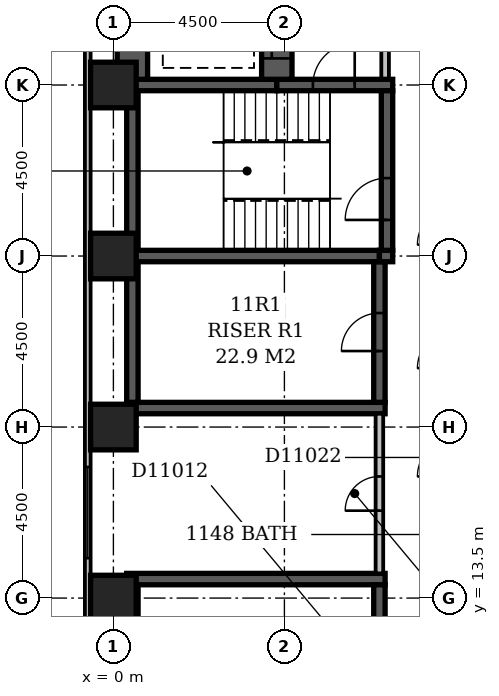
"""IFC4 building model, lengths in metres.
Left out: names, types, materials, properties, quantities, classifications, styles, units other than length and angle.
Written with IfcOpenShell. Run it as: python <this file> out.ifc"""

import sys

from ifc_helpers import new_model, si_unit, direction, frame, frame_2d, origin, origin_2d, place, context, subcontext, project, spatial, rectangle, extrude, element, fill, save


model = new_model("IFC4")
c1 = context("Model", 3, precision=1e-05, world=origin(), true_north=direction((0.0, 1.0)))
c2 = subcontext(c1, "Body", "Model", "MODEL_VIEW")
j1 = project(units=[si_unit("LENGTHUNIT", "METRE"), si_unit("PLANEANGLEUNIT", "RADIAN")], contexts=[c1])
p1 = place(None, origin())
s1 = spatial("IfcSite", under=j1, at=p1, CompositionType="ELEMENT")
p2 = place(p1, origin())
s2 = spatial("IfcBuilding", under=s1, at=p2, CompositionType="ELEMENT")
p3 = place(p2, frame((0.0, 0.0, 50.6)))
s3 = spatial("IfcBuildingStorey", under=s2, at=p3, CompositionType="ELEMENT", Elevation=50.6)
for number, where, z_axis, x_axis in (
    (1, (0.35, 14.0, -0.3), (0.0, 0.0, 1.0), (1.0, 0.0, 0.0)),
    (2, (0.35, 18.5, -0.3), (0.0, 0.0, 1.0), (1.0, 0.0, 0.0)),
):
    element("IfcWall", number, at=place(p3, frame(where, z_axis=z_axis, x_axis=x_axis)), inside=s3, PredefinedType="SHEAR", context=c2, shape_type="SweptSolid", body=[
        extrude(rectangle(XDim=6.8, YDim=0.3, at=frame_2d((3.4, 0.0))), origin(), (0.0, 0.0, 1.0), 3.6),
    ])
p4 = place(p3, frame((0.35, 22.5, -0.3), z_axis=(0.0, 0.0, 1.0), x_axis=(1.0, 0.0, 0.0)))
e3 = element("IfcWall", 3, at=p4, inside=s3, PredefinedType="SHEAR", context=c2, shape_type="SweptSolid", body=[
    extrude(rectangle(XDim=6.65, YDim=0.3, at=frame_2d((3.325, 0.0))), origin(), (0.0, 0.0, 1.0), 3.6),
])
p5 = place(p3, frame((0.35, 27.0, -0.3), z_axis=(0.0, 0.0, 1.0), x_axis=(1.0, 0.0, 0.0)))
e4 = element("IfcWall", 4, at=p5, inside=s3, PredefinedType="SHEAR", context=c2, shape_type="SweptSolid", body=[
    extrude(rectangle(XDim=3.95, YDim=0.3, at=frame_2d((1.975, 0.0))), origin(), (0.0, 0.0, 1.0), 3.6),
])
for number, where, z_axis, x_axis in (
    (5, (0.5, 10.15, -0.3), (0.0, 0.0, 1.0), (0.0, 1.0, 0.0)),
    (6, (0.5, 18.65, -0.3), (0.0, 0.0, 1.0), (0.0, 1.0, 0.0)),
):
    element("IfcWall", number, at=place(p3, frame(where, z_axis=z_axis, x_axis=x_axis)), inside=s3, PredefinedType="SHEAR", context=c2, shape_type="SweptSolid", body=[
        extrude(rectangle(XDim=3.7, YDim=0.3, at=frame_2d((1.85, 0.0))), origin(), (0.0, 0.0, 1.0), 3.6),
    ])
p6 = place(p3, frame((0.5, 22.65, -0.3), z_axis=(0.0, 0.0, 1.0), x_axis=(0.0, 1.0, 0.0)))
e7 = element("IfcWall", 7, at=p6, inside=s3, PredefinedType="SHEAR", context=c2, shape_type="SweptSolid", body=[
    extrude(rectangle(XDim=4.2, YDim=0.3, at=frame_2d((2.1, 0.0))), origin(), (0.0, 0.0, 1.0), 3.6),
])
p7 = place(p3, frame((0.5, 27.15, -0.3), z_axis=(0.0, 0.0, 1.0), x_axis=(0.0, 1.0, 0.0)))
e8 = element("IfcWall", 8, at=p7, inside=s3, PredefinedType="SHEAR", context=c2, shape_type="SweptSolid", body=[
    extrude(rectangle(XDim=6.95, YDim=0.8, at=frame_2d((3.475, 0.0))), origin(), (0.0, 0.0, 1.0), 3.6),
])
p8 = place(p3, frame((4.3, 27.0, -0.3), z_axis=(0.0, 0.0, 1.0), x_axis=(1.0, 0.0, 0.0)))
e9 = element("IfcWall", 9, at=p8, inside=s3, PredefinedType="SHEAR", context=c2, shape_type="SweptSolid", body=[
    extrude(rectangle(XDim=3.05, YDim=0.3, at=frame_2d((1.525, 0.0))), origin(), (0.0, 0.0, 1.0), 3.6),
])
p9 = place(p8, frame((0.95, 0.0, 0.3)))
e10 = element("IfcOpeningElement", 10, at=p9, cuts=e9, PredefinedType="OPENING", context=c2, shape_type="SweptSolid", body=[
    extrude(rectangle(XDim=1.1, YDim=2.1, at=frame_2d((0.55, 1.05))), frame((0.0, 0.162, 0.0), z_axis=(0.0, -1.0, 0.0), x_axis=(1.0, 0.0, 0.0)), (0.0, 0.0, 1.0), 0.324),
])
p10 = place(p3, frame((4.3, 27.15, -0.3), z_axis=(0.0, 0.0, 1.0), x_axis=(0.0, 1.0, 0.0)))
e11 = element("IfcWall", 11, at=p10, inside=s3, PredefinedType="SHEAR", context=c2, shape_type="SweptSolid", body=[
    extrude(rectangle(XDim=6.95, YDim=0.8, at=frame_2d((3.475, 0.0))), origin(), (0.0, 0.0, 1.0), 3.6),
])
p11 = place(p10, frame((3.05, 0.0, 0.3)))
e12 = element("IfcOpeningElement", 12, at=p11, cuts=e11, PredefinedType="OPENING", context=c2, shape_type="SweptSolid", body=[
    extrude(rectangle(XDim=1.1, YDim=2.1, at=frame_2d((0.55, 1.05))), frame((0.0, 0.412, 0.0), z_axis=(0.0, -1.0, 0.0), x_axis=(1.0, 0.0, 0.0)), (0.0, 0.0, 1.0), 0.824),
])
p12 = place(p10, frame((0.55, 0.0, 0.3)))
e13 = element("IfcOpeningElement", 13, at=p12, cuts=e11, PredefinedType="OPENING", context=c2, shape_type="SweptSolid", body=[
    extrude(rectangle(XDim=1.1, YDim=2.1, at=frame_2d((0.55, 1.05))), frame((0.0, 0.412, 0.0), z_axis=(0.0, -1.0, 0.0), x_axis=(1.0, 0.0, 0.0)), (0.0, 0.0, 1.0), 0.824),
])
p13 = place(p10, frame((5.35, 0.0, 0.3)))
e14 = element("IfcOpeningElement", 14, at=p13, cuts=e11, PredefinedType="OPENING", context=c2, shape_type="SweptSolid", body=[
    extrude(rectangle(XDim=1.1, YDim=2.1, at=frame_2d((0.55, 1.05))), frame((0.0, 0.412, 0.0), z_axis=(0.0, -1.0, 0.0), x_axis=(1.0, 0.0, 0.0)), (0.0, 0.0, 1.0), 0.824),
])
p14 = place(p3, frame((7.0, 10.15, -0.3), z_axis=(0.0, 0.0, 1.0), x_axis=(0.0, 1.0, 0.0)))
e15 = element("IfcWall", 15, at=p14, inside=s3, PredefinedType="SHEAR", context=c2, shape_type="SweptSolid", body=[
    extrude(rectangle(XDim=3.7, YDim=0.3, at=frame_2d((1.85, 0.0))), origin(), (0.0, 0.0, 1.0), 3.6),
])
p15 = place(p14, frame((1.35, 0.0, 0.3)))
e16 = element("IfcOpeningElement", 16, at=p15, cuts=e15, PredefinedType="OPENING", context=c2, shape_type="SweptSolid", body=[
    extrude(rectangle(XDim=1.0, YDim=2.1, at=frame_2d((0.5, 1.05))), frame((0.0, 0.162, 0.0), z_axis=(0.0, -1.0, 0.0), x_axis=(1.0, 0.0, 0.0)), (0.0, 0.0, 1.0), 0.324),
])
p16 = place(p3, frame((7.0, 18.65, -0.3), z_axis=(0.0, 0.0, 1.0), x_axis=(0.0, 1.0, 0.0)))
e17 = element("IfcWall", 17, at=p16, inside=s3, PredefinedType="SHEAR", context=c2, shape_type="SweptSolid", body=[
    extrude(rectangle(XDim=3.7, YDim=0.3, at=frame_2d((1.85, 0.0))), origin(), (0.0, 0.0, 1.0), 3.6),
])
p17 = place(p16, frame((1.35, 0.0, 0.3)))
e18 = element("IfcOpeningElement", 18, at=p17, cuts=e17, PredefinedType="OPENING", context=c2, shape_type="SweptSolid", body=[
    extrude(rectangle(XDim=1.0, YDim=2.1, at=frame_2d((0.5, 1.05))), frame((0.0, 0.162, 0.0), z_axis=(0.0, -1.0, 0.0), x_axis=(1.0, 0.0, 0.0)), (0.0, 0.0, 1.0), 0.324),
])
p18 = place(p3, frame((7.0, 22.5, -0.3), z_axis=(0.0, 0.0, 1.0), x_axis=(1.0, 0.0, 0.0)))
e19 = element("IfcWall", 19, at=p18, inside=s3, PredefinedType="SHEAR", context=c2, shape_type="SweptSolid", body=[
    extrude(rectangle(XDim=0.35, YDim=0.3, at=frame_2d((0.175, 0.0))), origin(), (0.0, 0.0, 1.0), 3.6),
])
p19 = place(p3, frame((7.2, 22.65, -0.3), z_axis=(0.0, 0.0, 1.0), x_axis=(0.0, 1.0, 0.0)))
e20 = element("IfcWall", 20, at=p19, inside=s3, PredefinedType="SHEAR", context=c2, shape_type="SweptSolid", body=[
    extrude(rectangle(XDim=4.2, YDim=0.3, at=frame_2d((2.1, 0.0))), origin(), (0.0, 0.0, 1.0), 3.6),
])
p20 = place(p19, frame((0.8, 0.0, 0.3)))
e21 = element("IfcOpeningElement", 21, at=p20, cuts=e20, PredefinedType="OPENING", context=c2, shape_type="SweptSolid", body=[
    extrude(rectangle(XDim=1.1, YDim=2.1, at=frame_2d((0.55, 1.05))), frame((0.0, 0.162, 0.0), z_axis=(0.0, -1.0, 0.0), x_axis=(1.0, 0.0, 0.0)), (0.0, 0.0, 1.0), 0.324),
])
for number, where, z_axis, x_axis in (
    (22, (0.0, 13.5, -0.3), (0.0, 0.0, 1.0), (1.0, 0.0, 0.0)),
    (23, (0.0, 18.0, -0.3), (0.0, 0.0, 1.0), (1.0, 0.0, 0.0)),
    (24, (0.0, 22.5, -0.3), (0.0, 0.0, 1.0), (1.0, 0.0, 0.0)),
    (25, (0.0, 27.0, -0.3), (0.0, 0.0, 1.0), (1.0, 0.0, 0.0)),
):
    element("IfcColumn", number, at=place(p3, frame(where, z_axis=z_axis, x_axis=x_axis)), inside=s3, PredefinedType="COLUMN", context=c2, shape_type="SweptSolid", body=[
        extrude(rectangle(XDim=1.2, YDim=1.2, at=origin_2d()), origin(), (0.0, 0.0, 1.0), 3.6),
    ])
p21 = place(p3, frame((-0.675, 59.1, 0.0), z_axis=(0.0, 0.0, 1.0), x_axis=(0.0, -1.0, 0.0)))
e26 = element("IfcWall", 26, at=p21, inside=s3, PredefinedType="STANDARD", context=c2, shape_type="SweptSolid", body=[
    extrude(rectangle(XDim=55.35, YDim=0.15, at=frame_2d((27.675, 0.0))), origin(), (0.0, 0.0, 1.0), 2.7),
])
p22 = place(p21, frame((10.65, 0.0, 0.6)))
e27 = element("IfcOpeningElement", 27, at=p22, cuts=e26, PredefinedType="OPENING", context=c2, shape_type="SweptSolid", body=[
    extrude(rectangle(XDim=2.4, YDim=1.8, at=frame_2d((1.2, 0.9))), frame((0.0, 0.087, 0.0), z_axis=(0.0, -1.0, 0.0), x_axis=(1.0, 0.0, 0.0)), (0.0, 0.0, 1.0), 0.174),
])
p23 = place(p21, frame((42.15, 0.0, 0.6)))
e28 = element("IfcOpeningElement", 28, at=p23, cuts=e26, PredefinedType="OPENING", context=c2, shape_type="SweptSolid", body=[
    extrude(rectangle(XDim=2.4, YDim=1.8, at=frame_2d((1.2, 0.9))), frame((0.0, 0.087, 0.0), z_axis=(0.0, -1.0, 0.0), x_axis=(1.0, 0.0, 0.0)), (0.0, 0.0, 1.0), 0.174),
])
p24 = place(p3, frame((7.15, 27.17, 0.0), z_axis=(0.0, 0.0, 1.0), x_axis=(0.0, 1.0, 0.0)))
e29 = element("IfcWall", 29, at=p24, inside=s3, PredefinedType="PARTITIONING", context=c2, shape_type="SweptSolid", body=[
    extrude(rectangle(XDim=4.83, YDim=0.2, at=frame_2d((2.415, 0.0))), origin(), (0.0, 0.0, 1.0), 3.3),
])
p25 = place(p24, frame((1.73, 0.0, 0.0)))
e30 = element("IfcOpeningElement", 30, at=p25, cuts=e29, PredefinedType="OPENING", context=c2, shape_type="SweptSolid", body=[
    extrude(rectangle(XDim=1.2, YDim=2.1, at=frame_2d((0.6, 1.05))), frame((0.0, 0.112, 0.0), z_axis=(0.0, -1.0, 0.0), x_axis=(1.0, 0.0, 0.0)), (0.0, 0.0, 1.0), 0.224),
])
p26 = place(p3, frame((7.0, 14.15, 0.0), z_axis=(0.0, 0.0, 1.0), x_axis=(0.0, 1.0, 0.0)))
e31 = element("IfcWall", 31, at=p26, inside=s3, PredefinedType="PARTITIONING", context=c2, shape_type="SweptSolid", body=[
    extrude(rectangle(XDim=4.2, YDim=0.2, at=frame_2d((2.1, 0.0))), origin(), (0.0, 0.0, 1.0), 3.3),
])
p27 = place(p26, frame((1.65, 0.0, 0.0)))
e32 = element("IfcOpeningElement", 32, at=p27, cuts=e31, PredefinedType="OPENING", context=c2, shape_type="SweptSolid", body=[
    extrude(rectangle(XDim=0.9, YDim=2.1, at=frame_2d((0.45, 1.05))), frame((0.0, 0.112, 0.0), z_axis=(0.0, -1.0, 0.0), x_axis=(1.0, 0.0, 0.0)), (0.0, 0.0, 1.0), 0.224),
])
p28 = place(p23, origin())
e33 = element("IfcWindow", 33, at=p28, inside=s3, PartitioningType="SINGLE_PANEL", PredefinedType="WINDOW", context=c2, shape_type="SweptSolid", body=[
    extrude(rectangle(XDim=2.4, YDim=1.8, at=frame_2d((1.2, 0.9))), frame((0.0, 0.03, 0.0), z_axis=(0.0, -1.0, 0.0), x_axis=(1.0, 0.0, 0.0)), (0.0, 0.0, 1.0), 0.06),
])
fill(e28, e33)
p29 = place(p12, origin())
e34 = element("IfcDoor", 34, at=p29, inside=s3, OperationType="SLIDING_TO_LEFT", PredefinedType="DOOR", context=c2, shape_type="SweptSolid", body=[
    extrude(rectangle(XDim=1.1, YDim=2.1, at=frame_2d((0.55, 1.05))), frame((0.0, 0.025, 0.0), z_axis=(0.0, -1.0, 0.0), x_axis=(1.0, 0.0, 0.0)), (0.0, 0.0, 1.0), 0.05),
])
fill(e13, e34)
p30 = place(p17, origin())
e35 = element("IfcDoor", 35, at=p30, inside=s3, OperationType="SINGLE_SWING_LEFT", PredefinedType="DOOR", context=c2, shape_type="SweptSolid", body=[
    extrude(rectangle(XDim=1.0, YDim=2.1, at=frame_2d((0.5, 1.05))), frame((0.0, 0.025, 0.0), z_axis=(0.0, -1.0, 0.0), x_axis=(1.0, 0.0, 0.0)), (0.0, 0.0, 1.0), 0.05),
])
fill(e18, e35)
p31 = place(p9, frame((1.1, 0.0, 0.0), z_axis=(0.0, 0.0, 1.0), x_axis=(-1.0, 0.0, 0.0)))
e36 = element("IfcDoor", 36, at=p31, inside=s3, OperationType="SINGLE_SWING_LEFT", PredefinedType="DOOR", context=c2, shape_type="SweptSolid", body=[
    extrude(rectangle(XDim=1.1, YDim=2.1, at=frame_2d((0.55, 1.05))), frame((0.0, 0.025, 0.0), z_axis=(0.0, -1.0, 0.0), x_axis=(1.0, 0.0, 0.0)), (0.0, 0.0, 1.0), 0.05),
])
fill(e10, e36)
p32 = place(p20, origin())
e37 = element("IfcDoor", 37, at=p32, inside=s3, OperationType="SINGLE_SWING_LEFT", PredefinedType="DOOR", context=c2, shape_type="SweptSolid", body=[
    extrude(rectangle(XDim=1.1, YDim=2.1, at=frame_2d((0.55, 1.05))), frame((0.0, 0.025, 0.0), z_axis=(0.0, -1.0, 0.0), x_axis=(1.0, 0.0, 0.0)), (0.0, 0.0, 1.0), 0.05),
])
fill(e21, e37)
p33 = place(p27, origin())
e38 = element("IfcDoor", 38, at=p33, inside=s3, OperationType="SINGLE_SWING_LEFT", PredefinedType="DOOR", context=c2, shape_type="SweptSolid", body=[
    extrude(rectangle(XDim=0.9, YDim=2.1, at=frame_2d((0.45, 1.05))), frame((0.0, 0.025, 0.0), z_axis=(0.0, -1.0, 0.0), x_axis=(1.0, 0.0, 0.0)), (0.0, 0.0, 1.0), 0.05),
])
fill(e32, e38)
save(model, sys.argv[1])
